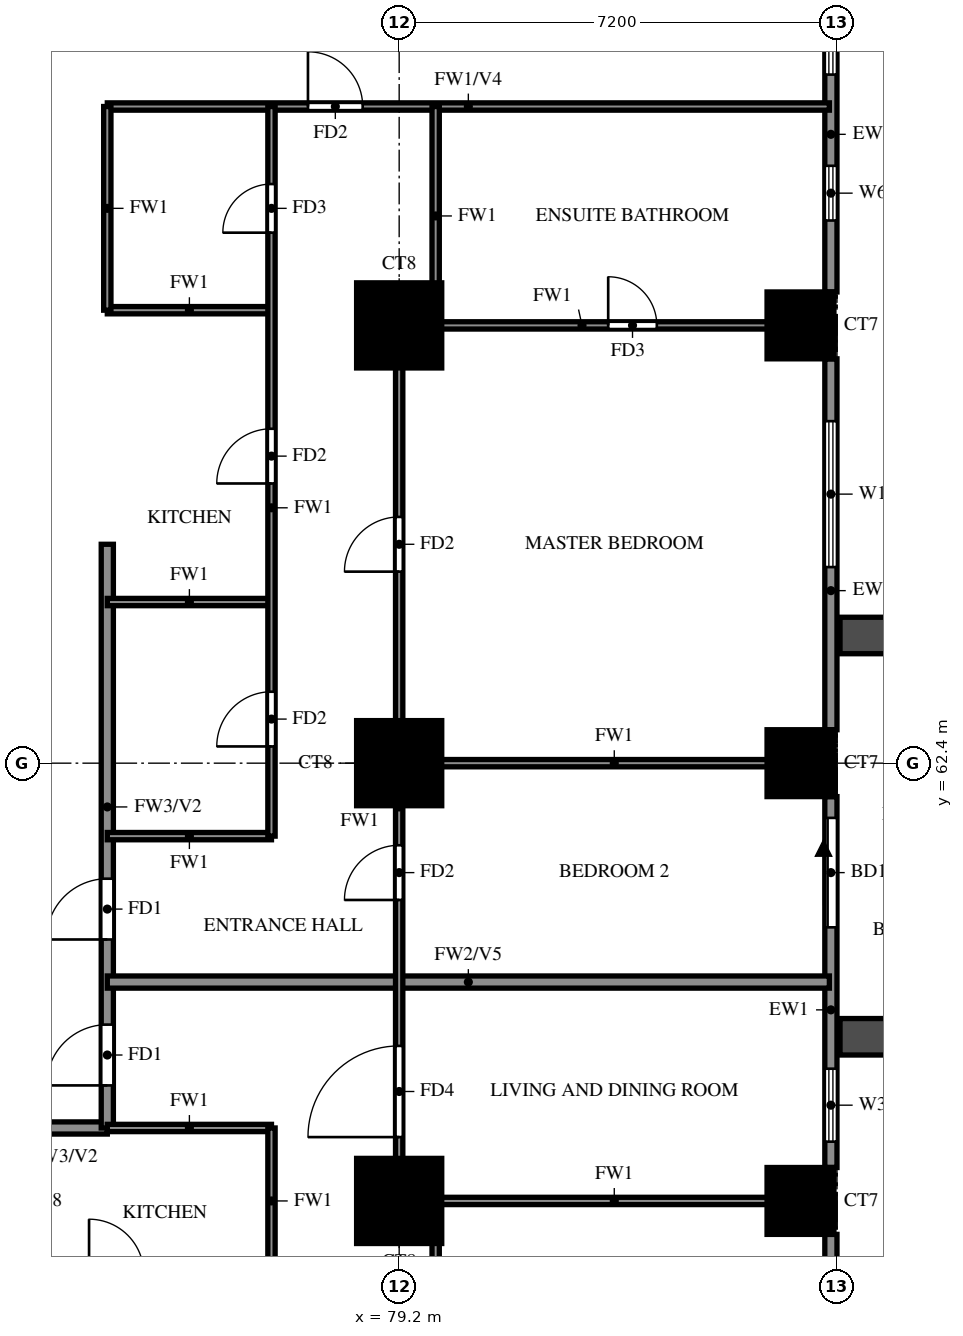
"""IFC4 building model, lengths in metres.
Left out: names, types, materials, properties, quantities, classifications, styles, units other than length and angle.
Written with IfcOpenShell. Run it as: python <this file> out.ifc"""

import sys

from ifc_helpers import new_model, si_unit, direction, frame, frame_2d, origin, origin_2d, place, context, subcontext, project, spatial, rectangle, extrude, source, transform, mapped, element, fill, save


model = new_model("IFC4")
c1 = context("Model", 3, precision=1e-05, world=origin(), true_north=direction((0.0, 1.0)))
c2 = subcontext(c1, "Body", "Model", "MODEL_VIEW")
j1 = project(units=[si_unit("LENGTHUNIT", "METRE"), si_unit("PLANEANGLEUNIT", "RADIAN")], contexts=[c1])
p1 = place(None, origin())
s1 = spatial("IfcSite", under=j1, at=p1, CompositionType="ELEMENT")
p2 = place(p1, origin())
s2 = spatial("IfcBuilding", under=s1, at=p2, CompositionType="ELEMENT")
p3 = place(p2, frame((0.0, 0.0, 55.0)))
s3 = spatial("IfcBuildingStorey", under=s2, at=p3, CompositionType="ELEMENT", Elevation=55.0)
m1 = source(origin(), c2, "Body", "SweptSolid", [
    extrude(rectangle(XDim=1.4, YDim=1.4, at=origin_2d()), origin(), (0.0, 0.0, 1.0), 3.18),
])
p4 = place(p3, frame((79.2, 55.2, 0.0), z_axis=(0.0, 0.0, 1.0), x_axis=(1.0, 0.0, 0.0)))
e1 = element("IfcColumn", 1, at=p4, inside=s3, PredefinedType="COLUMN", context=c2, shape_type="MappedRepresentation", body=[
    mapped(m1, transform((0.0, 0.0, 0.0))),
])
m2 = source(origin(), c2, "Body", "SweptSolid", [
    extrude(rectangle(XDim=1.1, YDim=1.1, at=origin_2d()), origin(), (0.0, 0.0, 1.0), 3.18),
])
p5 = place(p3, frame((85.8, 55.2, 0.0), z_axis=(0.0, 0.0, 1.0), x_axis=(1.0, 0.0, 0.0)))
e2 = element("IfcColumn", 2, at=p5, inside=s3, PredefinedType="COLUMN", context=c2, shape_type="MappedRepresentation", body=[
    mapped(m2, transform((0.0, 0.0, 0.0))),
])
p6 = place(p3, frame((79.2, 62.4, 0.0), z_axis=(0.0, 0.0, 1.0), x_axis=(1.0, 0.0, 0.0)))
e3 = element("IfcColumn", 3, at=p6, inside=s3, PredefinedType="COLUMN", context=c2, shape_type="MappedRepresentation", body=[
    mapped(m1, transform((0.0, 0.0, 0.0))),
])
p7 = place(p3, frame((85.8, 62.4, 0.0), z_axis=(0.0, 0.0, 1.0), x_axis=(1.0, 0.0, 0.0)))
e4 = element("IfcColumn", 4, at=p7, inside=s3, PredefinedType="COLUMN", context=c2, shape_type="MappedRepresentation", body=[
    mapped(m2, transform((0.0, 0.0, 0.0))),
])
p8 = place(p3, frame((79.2, 69.6, 0.0), z_axis=(0.0, 0.0, 1.0), x_axis=(1.0, 0.0, 0.0)))
e5 = element("IfcColumn", 5, at=p8, inside=s3, PredefinedType="COLUMN", context=c2, shape_type="MappedRepresentation", body=[
    mapped(m1, transform((0.0, 0.0, 0.0))),
])
p9 = place(p3, frame((85.8, 69.6, 0.0), z_axis=(0.0, 0.0, 1.0), x_axis=(1.0, 0.0, 0.0)))
e6 = element("IfcColumn", 6, at=p9, inside=s3, PredefinedType="COLUMN", context=c2, shape_type="MappedRepresentation", body=[
    mapped(m2, transform((0.0, 0.0, 0.0))),
])
p10 = place(p3, frame((86.3, 48.55, 0.0), z_axis=(0.0, 0.0, 1.0), x_axis=(0.0, 1.0, 0.0)))
e7 = element("IfcWall", 7, at=p10, inside=s3, PredefinedType="SOLIDWALL", context=c2, shape_type="SweptSolid", body=[
    extrude(rectangle(XDim=6.1, YDim=0.2, at=frame_2d((3.05, 0.0))), origin(), (0.0, 0.0, 1.0), 3.18),
])
p11 = place(p10, frame((0.725, 0.0, 0.6)))
e8 = element("IfcOpeningElement", 8, at=p11, cuts=e7, PredefinedType="OPENING", context=c2, shape_type="SweptSolid", body=[
    extrude(rectangle(XDim=1.8, YDim=2.4, at=frame_2d((0.9, 1.2))), frame((0.0, 0.11, 0.0), z_axis=(0.0, -1.0, 0.0), x_axis=(1.0, 0.0, 0.0)), (0.0, 0.0, 1.0), 0.22),
])
p12 = place(p10, frame((4.025, 0.0, 1.5)))
e9 = element("IfcOpeningElement", 9, at=p12, cuts=e7, PredefinedType="OPENING", context=c2, shape_type="SweptSolid", body=[
    extrude(rectangle(XDim=0.9, YDim=0.9, at=frame_2d((0.45, 0.45))), frame((0.0, 0.11, 0.0), z_axis=(0.0, -1.0, 0.0), x_axis=(1.0, 0.0, 0.0)), (0.0, 0.0, 1.0), 0.22),
])
p13 = place(p3, frame((86.3, 55.75, 0.0), z_axis=(0.0, 0.0, 1.0), x_axis=(0.0, 1.0, 0.0)))
e10 = element("IfcWall", 10, at=p13, inside=s3, PredefinedType="SOLIDWALL", context=c2, shape_type="SweptSolid", body=[
    extrude(rectangle(XDim=6.1, YDim=0.2, at=frame_2d((3.05, 0.0))), origin(), (0.0, 0.0, 1.0), 3.18),
])
p14 = place(p13, frame((3.95, 0.0, 0.0)))
e11 = element("IfcOpeningElement", 11, at=p14, cuts=e10, PredefinedType="OPENING", context=c2, shape_type="SweptSolid", body=[
    extrude(rectangle(XDim=1.8, YDim=2.4, at=frame_2d((0.9, 1.2))), frame((0.0, 0.11, 0.0), z_axis=(0.0, -1.0, 0.0), x_axis=(1.0, 0.0, 0.0)), (0.0, 0.0, 1.0), 0.22),
])
p15 = place(p13, frame((0.425, 0.0, 0.6)))
e12 = element("IfcOpeningElement", 12, at=p15, cuts=e10, PredefinedType="OPENING", context=c2, shape_type="SweptSolid", body=[
    extrude(rectangle(XDim=1.2, YDim=2.4, at=frame_2d((0.6, 1.2))), frame((0.0, 0.11, 0.0), z_axis=(0.0, -1.0, 0.0), x_axis=(1.0, 0.0, 0.0)), (0.0, 0.0, 1.0), 0.22),
])
p16 = place(p3, frame((86.3, 62.95, 0.0), z_axis=(0.0, 0.0, 1.0), x_axis=(0.0, 1.0, 0.0)))
e13 = element("IfcWall", 13, at=p16, inside=s3, PredefinedType="SOLIDWALL", context=c2, shape_type="SweptSolid", body=[
    extrude(rectangle(XDim=6.1, YDim=0.2, at=frame_2d((3.05, 0.0))), origin(), (0.0, 0.0, 1.0), 3.18),
])
p17 = place(p16, frame((2.675, 0.0, 0.6)))
e14 = element("IfcOpeningElement", 14, at=p17, cuts=e13, PredefinedType="OPENING", context=c2, shape_type="SweptSolid", body=[
    extrude(rectangle(XDim=2.4, YDim=2.4, at=frame_2d((1.2, 1.2))), frame((0.0, 0.11, 0.0), z_axis=(0.0, -1.0, 0.0), x_axis=(1.0, 0.0, 0.0)), (0.0, 0.0, 1.0), 0.22),
])
p18 = place(p3, frame((86.3, 70.15, 0.0), z_axis=(0.0, 0.0, 1.0), x_axis=(0.0, 1.0, 0.0)))
e15 = element("IfcWall", 15, at=p18, inside=s3, PredefinedType="SOLIDWALL", context=c2, shape_type="SweptSolid", body=[
    extrude(rectangle(XDim=6.1, YDim=0.2, at=frame_2d((3.05, 0.0))), origin(), (0.0, 0.0, 1.0), 3.18),
])
p19 = place(p18, frame((1.175, 0.0, 1.5)))
e16 = element("IfcOpeningElement", 16, at=p19, cuts=e15, PredefinedType="OPENING", context=c2, shape_type="SweptSolid", body=[
    extrude(rectangle(XDim=0.9, YDim=0.9, at=frame_2d((0.45, 0.45))), frame((0.0, 0.11, 0.0), z_axis=(0.0, -1.0, 0.0), x_axis=(1.0, 0.0, 0.0)), (0.0, 0.0, 1.0), 0.22),
])
p20 = place(p18, frame((3.575, 0.0, 0.6)))
e17 = element("IfcOpeningElement", 17, at=p20, cuts=e15, PredefinedType="OPENING", context=c2, shape_type="SweptSolid", body=[
    extrude(rectangle(XDim=1.8, YDim=2.4, at=frame_2d((0.9, 1.2))), frame((0.0, 0.11, 0.0), z_axis=(0.0, -1.0, 0.0), x_axis=(1.0, 0.0, 0.0)), (0.0, 0.0, 1.0), 0.22),
])
for number, where, z_axis, x_axis in (
    (18, (86.45, 57.9, 0.0), (0.0, 0.0, 1.0), (1.0, 0.0, 0.0)),
    (19, (86.45, 64.5, 0.0), (0.0, 0.0, 1.0), (1.0, 0.0, 0.0)),
):
    element("IfcWall", number, at=place(p3, frame(where, z_axis=z_axis, x_axis=x_axis)), inside=s3, PredefinedType="SOLIDWALL", context=c2, shape_type="SweptSolid", body=[
        extrude(rectangle(XDim=2.65, YDim=0.6, at=frame_2d((1.325, 0.0))), origin(), (0.0, 0.0, 1.0), 2.85),
    ])
p21 = place(p3, frame((72.0, 56.4, 0.0), z_axis=(0.0, 0.0, 1.0), x_axis=(1.0, 0.0, 0.0)))
e20 = element("IfcWall", 20, at=p21, inside=s3, PredefinedType="SOLIDWALL", context=c2, shape_type="SweptSolid", body=[
    extrude(rectangle(XDim=2.4, YDim=0.2, at=frame_2d((1.2, 0.0))), origin(), (0.0, 0.0, 1.0), 3.18),
])
p22 = place(p3, frame((74.4, 56.4, 0.0), z_axis=(0.0, 0.0, 1.0), x_axis=(0.0, 1.0, 0.0)))
e21 = element("IfcWall", 21, at=p22, inside=s3, PredefinedType="SOLIDWALL", context=c2, shape_type="SweptSolid", body=[
    extrude(rectangle(XDim=9.6, YDim=0.2, at=frame_2d((4.8, 0.0))), origin(), (0.0, 0.0, 1.0), 3.18),
])
p23 = place(p22, frame((0.7, 0.0, 0.0)))
e22 = element("IfcOpeningElement", 22, at=p23, cuts=e21, PredefinedType="OPENING", context=c2, shape_type="SweptSolid", body=[
    extrude(rectangle(XDim=1.0, YDim=2.1, at=frame_2d((0.5, 1.05))), frame((0.0, 0.11, 0.0), z_axis=(0.0, -1.0, 0.0), x_axis=(1.0, 0.0, 0.0)), (0.0, 0.0, 1.0), 0.22),
])
p24 = place(p22, frame((3.1, 0.0, 0.0)))
e23 = element("IfcOpeningElement", 23, at=p24, cuts=e21, PredefinedType="OPENING", context=c2, shape_type="SweptSolid", body=[
    extrude(rectangle(XDim=1.0, YDim=2.1, at=frame_2d((0.5, 1.05))), frame((0.0, 0.11, 0.0), z_axis=(0.0, -1.0, 0.0), x_axis=(1.0, 0.0, 0.0)), (0.0, 0.0, 1.0), 0.22),
])
p25 = place(p3, frame((74.4, 58.8, 0.0), z_axis=(0.0, 0.0, 1.0), x_axis=(1.0, 0.0, 0.0)))
e24 = element("IfcWall", 24, at=p25, inside=s3, PredefinedType="SOLIDWALL", context=c2, shape_type="SweptSolid", body=[
    extrude(rectangle(XDim=11.875, YDim=0.2, at=frame_2d((5.938, 0.0))), origin(), (0.0, 0.0, 1.0), 2.28),
])
p26 = place(p3, frame((79.2, 55.2, 0.0), z_axis=(0.0, 0.0, 1.0), x_axis=(1.0, 0.0, 0.0)))
e25 = element("IfcWall", 25, at=p26, inside=s3, PredefinedType="PARTITIONING", context=c2, shape_type="SweptSolid", body=[
    extrude(rectangle(XDim=7.075, YDim=0.12, at=frame_2d((3.538, 0.0))), origin(), (0.0, 0.0, 1.0), 3.18),
])
for number, where, z_axis, x_axis in (
    (26, (74.4, 56.4, 0.0), (0.0, 0.0, 1.0), (1.0, 0.0, 0.0)),
    (27, (74.4, 61.2, 0.0), (0.0, 0.0, 1.0), (1.0, 0.0, 0.0)),
):
    element("IfcWall", number, at=place(p3, frame(where, z_axis=z_axis, x_axis=x_axis)), inside=s3, PredefinedType="PARTITIONING", context=c2, shape_type="SweptSolid", body=[
        extrude(rectangle(XDim=2.7, YDim=0.12, at=frame_2d((1.35, 0.0))), origin(), (0.0, 0.0, 1.0), 3.18),
    ])
p27 = place(p3, frame((79.2, 62.4, 0.0), z_axis=(0.0, 0.0, 1.0), x_axis=(1.0, 0.0, 0.0)))
e28 = element("IfcWall", 28, at=p27, inside=s3, PredefinedType="PARTITIONING", context=c2, shape_type="SweptSolid", body=[
    extrude(rectangle(XDim=7.075, YDim=0.12, at=frame_2d((3.538, 0.0))), origin(), (0.0, 0.0, 1.0), 3.18),
])
p28 = place(p3, frame((74.4, 65.05, 0.0), z_axis=(0.0, 0.0, 1.0), x_axis=(1.0, 0.0, 0.0)))
e29 = element("IfcWall", 29, at=p28, inside=s3, PredefinedType="PARTITIONING", context=c2, shape_type="SweptSolid", body=[
    extrude(rectangle(XDim=2.7, YDim=0.12, at=frame_2d((1.35, 0.0))), origin(), (0.0, 0.0, 1.0), 3.18),
])
p29 = place(p3, frame((79.2, 69.6, 0.0), z_axis=(0.0, 0.0, 1.0), x_axis=(1.0, 0.0, 0.0)))
e30 = element("IfcWall", 30, at=p29, inside=s3, PredefinedType="PARTITIONING", context=c2, shape_type="SweptSolid", body=[
    extrude(rectangle(XDim=7.075, YDim=0.12, at=frame_2d((3.538, 0.0))), origin(), (0.0, 0.0, 1.0), 3.18),
])
p30 = place(p29, frame((3.438, 0.0, 0.0)))
e31 = element("IfcOpeningElement", 31, at=p30, cuts=e30, PredefinedType="OPENING", context=c2, shape_type="SweptSolid", body=[
    extrude(rectangle(XDim=0.8, YDim=2.1, at=frame_2d((0.4, 1.05))), frame((0.0, 0.07, 0.0), z_axis=(0.0, -1.0, 0.0), x_axis=(1.0, 0.0, 0.0)), (0.0, 0.0, 1.0), 0.14),
])
p31 = place(p3, frame((74.4, 69.85, 0.0), z_axis=(0.0, 0.0, 1.0), x_axis=(1.0, 0.0, 0.0)))
e32 = element("IfcWall", 32, at=p31, inside=s3, PredefinedType="PARTITIONING", context=c2, shape_type="SweptSolid", body=[
    extrude(rectangle(XDim=2.7, YDim=0.12, at=frame_2d((1.35, 0.0))), origin(), (0.0, 0.0, 1.0), 3.18),
])
p32 = place(p3, frame((74.4, 73.2, 0.0), z_axis=(0.0, 0.0, 1.0), x_axis=(1.0, 0.0, 0.0)))
e33 = element("IfcWall", 33, at=p32, inside=s3, PredefinedType="PARTITIONING", context=c2, shape_type="SweptSolid", body=[
    extrude(rectangle(XDim=11.875, YDim=0.12, at=frame_2d((5.938, 0.0))), origin(), (0.0, 0.0, 1.0), 2.28),
])
p33 = place(p32, frame((3.3, 0.0, 0.0)))
e34 = element("IfcOpeningElement", 34, at=p33, cuts=e33, PredefinedType="OPENING", context=c2, shape_type="SweptSolid", body=[
    extrude(rectangle(XDim=0.9, YDim=2.1, at=frame_2d((0.45, 1.05))), frame((0.0, 0.07, 0.0), z_axis=(0.0, -1.0, 0.0), x_axis=(1.0, 0.0, 0.0)), (0.0, 0.0, 1.0), 0.14),
])
p34 = place(p3, frame((74.4, 69.85, 0.0), z_axis=(0.0, 0.0, 1.0), x_axis=(0.0, 1.0, 0.0)))
e35 = element("IfcWall", 35, at=p34, inside=s3, PredefinedType="PARTITIONING", context=c2, shape_type="SweptSolid", body=[
    extrude(rectangle(XDim=3.35, YDim=0.12, at=frame_2d((1.675, 0.0))), origin(), (0.0, 0.0, 1.0), 3.18),
])
p35 = place(p3, frame((77.1, 54.0, 0.0), z_axis=(0.0, 0.0, 1.0), x_axis=(0.0, 1.0, 0.0)))
e36 = element("IfcWall", 36, at=p35, inside=s3, PredefinedType="PARTITIONING", context=c2, shape_type="SweptSolid", body=[
    extrude(rectangle(XDim=2.4, YDim=0.12, at=frame_2d((1.2, 0.0))), origin(), (0.0, 0.0, 1.0), 3.18),
])
p36 = place(p3, frame((77.1, 61.2, 0.0), z_axis=(0.0, 0.0, 1.0), x_axis=(0.0, 1.0, 0.0)))
e37 = element("IfcWall", 37, at=p36, inside=s3, PredefinedType="PARTITIONING", context=c2, shape_type="SweptSolid", body=[
    extrude(rectangle(XDim=12.0, YDim=0.12, at=frame_2d((6.0, 0.0))), origin(), (0.0, 0.0, 1.0), 3.18),
])
p37 = place(p36, frame((1.475, 0.0, 0.0)))
e38 = element("IfcOpeningElement", 38, at=p37, cuts=e37, PredefinedType="OPENING", context=c2, shape_type="SweptSolid", body=[
    extrude(rectangle(XDim=0.9, YDim=2.1, at=frame_2d((0.45, 1.05))), frame((0.0, 0.07, 0.0), z_axis=(0.0, -1.0, 0.0), x_axis=(1.0, 0.0, 0.0)), (0.0, 0.0, 1.0), 0.14),
])
p38 = place(p36, frame((5.8, 0.0, 0.0)))
e39 = element("IfcOpeningElement", 39, at=p38, cuts=e37, PredefinedType="OPENING", context=c2, shape_type="SweptSolid", body=[
    extrude(rectangle(XDim=0.9, YDim=2.1, at=frame_2d((0.45, 1.05))), frame((0.0, 0.07, 0.0), z_axis=(0.0, -1.0, 0.0), x_axis=(1.0, 0.0, 0.0)), (0.0, 0.0, 1.0), 0.14),
])
p39 = place(p36, frame((9.925, 0.0, 0.0)))
e40 = element("IfcOpeningElement", 40, at=p39, cuts=e37, PredefinedType="OPENING", context=c2, shape_type="SweptSolid", body=[
    extrude(rectangle(XDim=0.8, YDim=2.1, at=frame_2d((0.4, 1.05))), frame((0.0, 0.07, 0.0), z_axis=(0.0, -1.0, 0.0), x_axis=(1.0, 0.0, 0.0)), (0.0, 0.0, 1.0), 0.14),
])
p40 = place(p3, frame((79.2, 55.2, 0.0), z_axis=(0.0, 0.0, 1.0), x_axis=(0.0, 1.0, 0.0)))
e41 = element("IfcWall", 41, at=p40, inside=s3, PredefinedType="PARTITIONING", context=c2, shape_type="SweptSolid", body=[
    extrude(rectangle(XDim=14.4, YDim=0.12, at=frame_2d((7.2, 0.0))), origin(), (0.0, 0.0, 1.0), 3.18),
])
p41 = place(p40, frame((1.05, 0.0, 0.0)))
e42 = element("IfcOpeningElement", 42, at=p41, cuts=e41, PredefinedType="OPENING", context=c2, shape_type="SweptSolid", body=[
    extrude(rectangle(XDim=1.5, YDim=2.1, at=frame_2d((0.75, 1.05))), frame((0.0, 0.07, 0.0), z_axis=(0.0, -1.0, 0.0), x_axis=(1.0, 0.0, 0.0)), (0.0, 0.0, 1.0), 0.14),
])
p42 = place(p40, frame((4.95, 0.0, 0.0)))
e43 = element("IfcOpeningElement", 43, at=p42, cuts=e41, PredefinedType="OPENING", context=c2, shape_type="SweptSolid", body=[
    extrude(rectangle(XDim=0.9, YDim=2.1, at=frame_2d((0.45, 1.05))), frame((0.0, 0.07, 0.0), z_axis=(0.0, -1.0, 0.0), x_axis=(1.0, 0.0, 0.0)), (0.0, 0.0, 1.0), 0.14),
])
p43 = place(p40, frame((10.35, 0.0, 0.0)))
e44 = element("IfcOpeningElement", 44, at=p43, cuts=e41, PredefinedType="OPENING", context=c2, shape_type="SweptSolid", body=[
    extrude(rectangle(XDim=0.9, YDim=2.1, at=frame_2d((0.45, 1.05))), frame((0.0, 0.07, 0.0), z_axis=(0.0, -1.0, 0.0), x_axis=(1.0, 0.0, 0.0)), (0.0, 0.0, 1.0), 0.14),
])
for number, where, z_axis, x_axis in (
    (45, (79.8, 51.6, 0.0), (0.0, 0.0, 1.0), (0.0, 1.0, 0.0)),
    (46, (79.8, 69.6, 0.0), (0.0, 0.0, 1.0), (0.0, 1.0, 0.0)),
):
    element("IfcWall", number, at=place(p3, frame(where, z_axis=z_axis, x_axis=x_axis)), inside=s3, PredefinedType="PARTITIONING", context=c2, shape_type="SweptSolid", body=[
        extrude(rectangle(XDim=3.6, YDim=0.12, at=frame_2d((1.8, 0.0))), origin(), (0.0, 0.0, 1.0), 3.18),
    ])
p44 = place(p14, origin())
e47 = element("IfcDoor", 47, at=p44, inside=s3, OperationType="DOUBLE_DOOR_SLIDING", PredefinedType="DOOR", context=c2, shape_type="SweptSolid", body=[
    extrude(rectangle(XDim=1.8, YDim=2.4, at=frame_2d((0.9, 1.2))), frame((0.0, 0.025, 0.0), z_axis=(0.0, -1.0, 0.0), x_axis=(1.0, 0.0, 0.0)), (0.0, 0.0, 1.0), 0.05),
])
fill(e11, e47)
p45 = place(p15, origin())
e48 = element("IfcWindow", 48, at=p45, inside=s3, PartitioningType="SINGLE_PANEL", PredefinedType="WINDOW", context=c2, shape_type="SweptSolid", body=[
    extrude(rectangle(XDim=1.2, YDim=2.4, at=frame_2d((0.6, 1.2))), frame((0.0, 0.03, 0.0), z_axis=(0.0, -1.0, 0.0), x_axis=(1.0, 0.0, 0.0)), (0.0, 0.0, 1.0), 0.06),
])
fill(e12, e48)
p46 = place(p17, origin())
e49 = element("IfcWindow", 49, at=p46, inside=s3, PartitioningType="DOUBLE_PANEL_VERTICAL", PredefinedType="WINDOW", context=c2, shape_type="SweptSolid", body=[
    extrude(rectangle(XDim=2.4, YDim=2.4, at=frame_2d((1.2, 1.2))), frame((0.0, 0.03, 0.0), z_axis=(0.0, -1.0, 0.0), x_axis=(1.0, 0.0, 0.0)), (0.0, 0.0, 1.0), 0.06),
])
fill(e14, e49)
p47 = place(p19, origin())
e50 = element("IfcWindow", 50, at=p47, inside=s3, PartitioningType="SINGLE_PANEL", PredefinedType="WINDOW", context=c2, shape_type="SweptSolid", body=[
    extrude(rectangle(XDim=0.9, YDim=0.9, at=frame_2d((0.45, 0.45))), frame((0.0, 0.03, 0.0), z_axis=(0.0, -1.0, 0.0), x_axis=(1.0, 0.0, 0.0)), (0.0, 0.0, 1.0), 0.06),
])
fill(e16, e50)
p48 = place(p20, origin())
e51 = element("IfcWindow", 51, at=p48, inside=s3, PartitioningType="DOUBLE_PANEL_VERTICAL", PredefinedType="WINDOW", context=c2, shape_type="SweptSolid", body=[
    extrude(rectangle(XDim=1.8, YDim=2.4, at=frame_2d((0.9, 1.2))), frame((0.0, 0.03, 0.0), z_axis=(0.0, -1.0, 0.0), x_axis=(1.0, 0.0, 0.0)), (0.0, 0.0, 1.0), 0.06),
])
fill(e17, e51)
p49 = place(p23, origin())
e52 = element("IfcDoor", 52, at=p49, inside=s3, OperationType="SINGLE_SWING_RIGHT", PredefinedType="DOOR", context=c2, shape_type="SweptSolid", body=[
    extrude(rectangle(XDim=1.0, YDim=2.1, at=frame_2d((0.5, 1.05))), frame((0.0, 0.025, 0.0), z_axis=(0.0, -1.0, 0.0), x_axis=(1.0, 0.0, 0.0)), (0.0, 0.0, 1.0), 0.05),
])
fill(e22, e52)
p50 = place(p41, origin())
e53 = element("IfcDoor", 53, at=p50, inside=s3, OperationType="SINGLE_SWING_RIGHT", PredefinedType="DOOR", context=c2, shape_type="SweptSolid", body=[
    extrude(rectangle(XDim=1.5, YDim=2.1, at=frame_2d((0.75, 1.05))), frame((0.0, 0.025, 0.0), z_axis=(0.0, -1.0, 0.0), x_axis=(1.0, 0.0, 0.0)), (0.0, 0.0, 1.0), 0.05),
])
fill(e42, e53)
p51 = place(p24, origin())
e54 = element("IfcDoor", 54, at=p51, inside=s3, OperationType="SINGLE_SWING_RIGHT", PredefinedType="DOOR", context=c2, shape_type="SweptSolid", body=[
    extrude(rectangle(XDim=1.0, YDim=2.1, at=frame_2d((0.5, 1.05))), frame((0.0, 0.025, 0.0), z_axis=(0.0, -1.0, 0.0), x_axis=(1.0, 0.0, 0.0)), (0.0, 0.0, 1.0), 0.05),
])
fill(e23, e54)
p52 = place(p42, origin())
e55 = element("IfcDoor", 55, at=p52, inside=s3, OperationType="SINGLE_SWING_LEFT", PredefinedType="DOOR", context=c2, shape_type="SweptSolid", body=[
    extrude(rectangle(XDim=0.9, YDim=2.1, at=frame_2d((0.45, 1.05))), frame((0.0, 0.025, 0.0), z_axis=(0.0, -1.0, 0.0), x_axis=(1.0, 0.0, 0.0)), (0.0, 0.0, 1.0), 0.05),
])
fill(e43, e55)
p53 = place(p43, origin())
e56 = element("IfcDoor", 56, at=p53, inside=s3, OperationType="SINGLE_SWING_LEFT", PredefinedType="DOOR", context=c2, shape_type="SweptSolid", body=[
    extrude(rectangle(XDim=0.9, YDim=2.1, at=frame_2d((0.45, 1.05))), frame((0.0, 0.025, 0.0), z_axis=(0.0, -1.0, 0.0), x_axis=(1.0, 0.0, 0.0)), (0.0, 0.0, 1.0), 0.05),
])
fill(e44, e56)
p54 = place(p30, origin())
e57 = element("IfcDoor", 57, at=p54, inside=s3, OperationType="SINGLE_SWING_RIGHT", PredefinedType="DOOR", context=c2, shape_type="SweptSolid", body=[
    extrude(rectangle(XDim=0.8, YDim=2.1, at=frame_2d((0.4, 1.05))), frame((0.0, 0.025, 0.0), z_axis=(0.0, -1.0, 0.0), x_axis=(1.0, 0.0, 0.0)), (0.0, 0.0, 1.0), 0.05),
])
fill(e31, e57)
p55 = place(p33, origin())
e58 = element("IfcDoor", 58, at=p55, inside=s3, OperationType="SINGLE_SWING_LEFT", PredefinedType="DOOR", context=c2, shape_type="SweptSolid", body=[
    extrude(rectangle(XDim=0.9, YDim=2.1, at=frame_2d((0.45, 1.05))), frame((0.0, 0.025, 0.0), z_axis=(0.0, -1.0, 0.0), x_axis=(1.0, 0.0, 0.0)), (0.0, 0.0, 1.0), 0.05),
])
fill(e34, e58)
p56 = place(p37, origin())
e59 = element("IfcDoor", 59, at=p56, inside=s3, OperationType="SINGLE_SWING_LEFT", PredefinedType="DOOR", context=c2, shape_type="SweptSolid", body=[
    extrude(rectangle(XDim=0.9, YDim=2.1, at=frame_2d((0.45, 1.05))), frame((0.0, 0.025, 0.0), z_axis=(0.0, -1.0, 0.0), x_axis=(1.0, 0.0, 0.0)), (0.0, 0.0, 1.0), 0.05),
])
fill(e38, e59)
p57 = place(p38, origin())
e60 = element("IfcDoor", 60, at=p57, inside=s3, OperationType="SINGLE_SWING_RIGHT", PredefinedType="DOOR", context=c2, shape_type="SweptSolid", body=[
    extrude(rectangle(XDim=0.9, YDim=2.1, at=frame_2d((0.45, 1.05))), frame((0.0, 0.025, 0.0), z_axis=(0.0, -1.0, 0.0), x_axis=(1.0, 0.0, 0.0)), (0.0, 0.0, 1.0), 0.05),
])
fill(e39, e60)
p58 = place(p39, origin())
e61 = element("IfcDoor", 61, at=p58, inside=s3, OperationType="SINGLE_SWING_LEFT", PredefinedType="DOOR", context=c2, shape_type="SweptSolid", body=[
    extrude(rectangle(XDim=0.8, YDim=2.1, at=frame_2d((0.4, 1.05))), frame((0.0, 0.025, 0.0), z_axis=(0.0, -1.0, 0.0), x_axis=(1.0, 0.0, 0.0)), (0.0, 0.0, 1.0), 0.05),
])
fill(e40, e61)
save(model, sys.argv[1])
